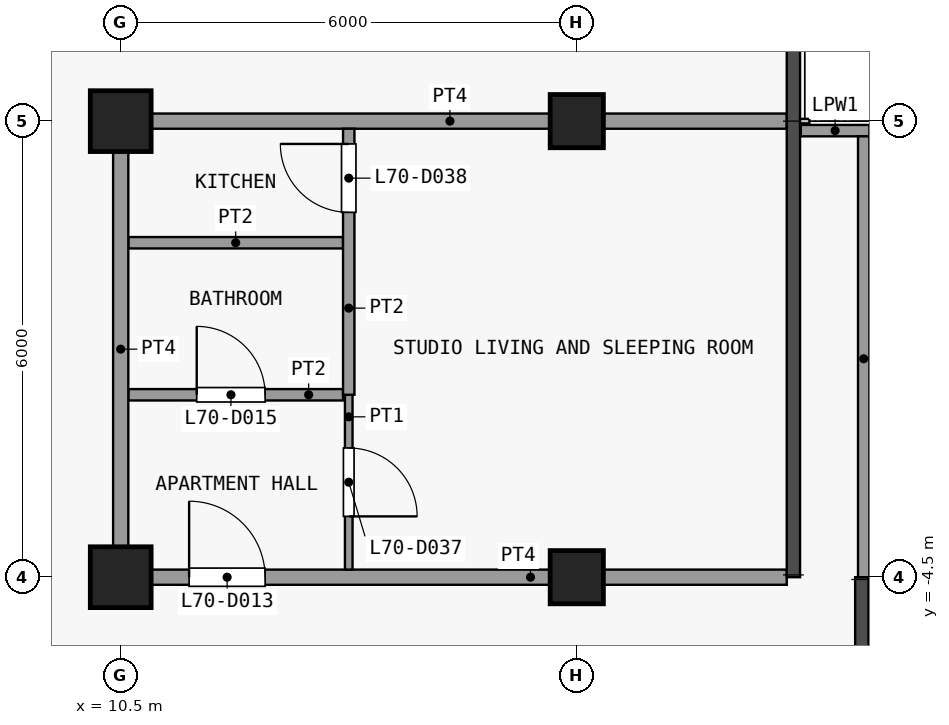
"""IFC4 building model, lengths in metres.
Left out: names, types, materials, properties, quantities, classifications, styles, units other than length and angle.
Written with IfcOpenShell. Run it as: python <this file> out.ifc"""

import sys

from ifc_helpers import new_model, si_unit, direction, frame, frame_2d, origin, origin_2d, place, context, subcontext, project, spatial, rectangle, extrude, element, fill, save


model = new_model("IFC4")
c1 = context("Model", 3, precision=1e-05, world=origin(), true_north=direction((0.0, 1.0)))
c2 = subcontext(c1, "Body", "Model", "MODEL_VIEW")
j1 = project(units=[si_unit("LENGTHUNIT", "METRE"), si_unit("PLANEANGLEUNIT", "RADIAN")], contexts=[c1])
p1 = place(None, origin())
s1 = spatial("IfcSite", under=j1, at=p1, CompositionType="ELEMENT")
p2 = place(p1, origin())
s2 = spatial("IfcBuilding", under=s1, at=p2, CompositionType="ELEMENT")
p3 = place(p2, frame((0.0, 0.0, 277.1)))
s3 = spatial("IfcBuildingStorey", under=s2, at=p3, CompositionType="ELEMENT", Elevation=277.1)
for number, where, z_axis, x_axis in (
    (1, (10.5, -4.5, 0.0), (0.0, 0.0, 1.0), (1.0, 0.0, 0.0)),
    (2, (10.5, 1.5, 0.0), (0.0, 0.0, 1.0), (1.0, 0.0, 0.0)),
):
    element("IfcColumn", number, at=place(p3, frame(where, z_axis=z_axis, x_axis=x_axis)), inside=s3, PredefinedType="COLUMN", context=c2, shape_type="SweptSolid", body=[
        extrude(rectangle(XDim=0.8, YDim=0.8, at=origin_2d()), origin(), (0.0, 0.0, 1.0), 3.6),
    ])
for number, where, z_axis, x_axis in (
    (3, (16.5, -4.5, 0.0), (0.0, 0.0, 1.0), (1.0, 0.0, 0.0)),
    (4, (16.5, 1.5, 0.0), (0.0, 0.0, 1.0), (1.0, 0.0, 0.0)),
):
    element("IfcColumn", number, at=place(p3, frame(where, z_axis=z_axis, x_axis=x_axis)), inside=s3, PredefinedType="COLUMN", context=c2, shape_type="SweptSolid", body=[
        extrude(rectangle(XDim=0.7, YDim=0.7, at=origin_2d()), origin(), (0.0, 0.0, 1.0), 3.6),
    ])
p4 = place(p3, frame((19.448, 1.375, 0.0), z_axis=(0.0, 0.0, 1.0), x_axis=(1.0, 0.0, 0.0)))
e5 = element("IfcWall", 5, at=p4, inside=s3, PredefinedType="PARAPET", context=c2, shape_type="SweptSolid", body=[
    extrude(rectangle(XDim=0.903, YDim=0.15, at=frame_2d((0.451, 0.0))), origin(), (0.0, 0.0, 1.0), 1.15),
])
p5 = place(p3, frame((20.275, 1.3, 0.0), z_axis=(0.0, 0.0, 1.0), x_axis=(0.0, -1.0, 0.0)))
e6 = element("IfcWall", 6, at=p5, inside=s3, PredefinedType="PARAPET", context=c2, shape_type="SweptSolid", body=[
    extrude(rectangle(XDim=5.853, YDim=0.15, at=frame_2d((2.926, 0.0))), origin(), (0.0, 0.0, 1.0), 1.15),
])
p6 = place(p3, frame((10.4, -4.5, 0.0), z_axis=(0.0, 0.0, 1.0), x_axis=(1.0, 0.0, 0.0)))
e7 = element("IfcWall", 7, at=p6, inside=s3, PredefinedType="PARTITIONING", context=c2, shape_type="SweptSolid", body=[
    extrude(rectangle(XDim=8.863, YDim=0.2, at=frame_2d((4.431, 0.0))), origin(), (0.0, 0.0, 1.0), 3.3),
])
p7 = place(p6, frame((1.0, 0.0, 0.0)))
e8 = element("IfcOpeningElement", 8, at=p7, cuts=e7, PredefinedType="OPENING", context=c2, shape_type="SweptSolid", body=[
    extrude(rectangle(XDim=1.0, YDim=2.1, at=frame_2d((0.5, 1.05))), frame((0.0, 0.11, 0.0), z_axis=(0.0, -1.0, 0.0), x_axis=(1.0, 0.0, 0.0)), (0.0, 0.0, 1.0), 0.22),
])
p8 = place(p3, frame((10.6, -2.1, 0.0), z_axis=(0.0, 0.0, 1.0), x_axis=(1.0, 0.0, 0.0)))
e9 = element("IfcWall", 9, at=p8, inside=s3, PredefinedType="PARTITIONING", context=c2, shape_type="SweptSolid", body=[
    extrude(rectangle(XDim=2.825, YDim=0.15, at=frame_2d((1.413, 0.0))), origin(), (0.0, 0.0, 1.0), 3.3),
])
p9 = place(p8, frame((0.9, 0.0, 0.0)))
e10 = element("IfcOpeningElement", 10, at=p9, cuts=e9, PredefinedType="OPENING", context=c2, shape_type="SweptSolid", body=[
    extrude(rectangle(XDim=0.9, YDim=2.1, at=frame_2d((0.45, 1.05))), frame((0.0, 0.085, 0.0), z_axis=(0.0, -1.0, 0.0), x_axis=(1.0, 0.0, 0.0)), (0.0, 0.0, 1.0), 0.17),
])
p10 = place(p3, frame((10.6, -0.1, 0.0), z_axis=(0.0, 0.0, 1.0), x_axis=(1.0, 0.0, 0.0)))
e11 = element("IfcWall", 11, at=p10, inside=s3, PredefinedType="PARTITIONING", context=c2, shape_type="SweptSolid", body=[
    extrude(rectangle(XDim=2.825, YDim=0.15, at=frame_2d((1.413, 0.0))), origin(), (0.0, 0.0, 1.0), 3.3),
])
p11 = place(p3, frame((10.4, 1.5, 0.0), z_axis=(0.0, 0.0, 1.0), x_axis=(1.0, 0.0, 0.0)))
e12 = element("IfcWall", 12, at=p11, inside=s3, PredefinedType="PARTITIONING", context=c2, shape_type="SweptSolid", body=[
    extrude(rectangle(XDim=8.863, YDim=0.2, at=frame_2d((4.431, 0.0))), origin(), (0.0, 0.0, 1.0), 3.3),
])
p12 = place(p3, frame((10.5, -4.4, 0.0), z_axis=(0.0, 0.0, 1.0), x_axis=(0.0, 1.0, 0.0)))
e13 = element("IfcWall", 13, at=p12, inside=s3, PredefinedType="PARTITIONING", context=c2, shape_type="SweptSolid", body=[
    extrude(rectangle(XDim=5.8, YDim=0.2, at=frame_2d((2.9, 0.0))), origin(), (0.0, 0.0, 1.0), 3.3),
])
p13 = place(p3, frame((13.5, -4.4, 0.0), z_axis=(0.0, 0.0, 1.0), x_axis=(0.0, 1.0, 0.0)))
e14 = element("IfcWall", 14, at=p13, inside=s3, PredefinedType="PARTITIONING", context=c2, shape_type="SweptSolid", body=[
    extrude(rectangle(XDim=2.3, YDim=0.1, at=frame_2d((1.15, 0.0))), origin(), (0.0, 0.0, 1.0), 3.3),
])
p14 = place(p13, frame((0.7, 0.0, 0.0)))
e15 = element("IfcOpeningElement", 15, at=p14, cuts=e14, PredefinedType="OPENING", context=c2, shape_type="SweptSolid", body=[
    extrude(rectangle(XDim=0.9, YDim=2.1, at=frame_2d((0.45, 1.05))), frame((0.0, 0.06, 0.0), z_axis=(0.0, -1.0, 0.0), x_axis=(1.0, 0.0, 0.0)), (0.0, 0.0, 1.0), 0.12),
])
p15 = place(p3, frame((13.5, -2.1, 0.0), z_axis=(0.0, 0.0, 1.0), x_axis=(0.0, 1.0, 0.0)))
e16 = element("IfcWall", 16, at=p15, inside=s3, PredefinedType="PARTITIONING", context=c2, shape_type="SweptSolid", body=[
    extrude(rectangle(XDim=3.5, YDim=0.15, at=frame_2d((1.75, 0.0))), origin(), (0.0, 0.0, 1.0), 3.3),
])
p16 = place(p15, frame((2.4, 0.0, 0.0)))
e17 = element("IfcOpeningElement", 17, at=p16, cuts=e16, PredefinedType="OPENING", context=c2, shape_type="SweptSolid", body=[
    extrude(rectangle(XDim=0.9, YDim=2.1, at=frame_2d((0.45, 1.05))), frame((0.0, 0.085, 0.0), z_axis=(0.0, -1.0, 0.0), x_axis=(1.0, 0.0, 0.0)), (0.0, 0.0, 1.0), 0.17),
])
p17 = place(p7, origin())
e18 = element("IfcDoor", 18, at=p17, inside=s3, OperationType="SINGLE_SWING_RIGHT", PredefinedType="DOOR", context=c2, shape_type="SweptSolid", body=[
    extrude(rectangle(XDim=1.0, YDim=2.1, at=frame_2d((0.5, 1.05))), frame((0.0, 0.025, 0.0), z_axis=(0.0, -1.0, 0.0), x_axis=(1.0, 0.0, 0.0)), (0.0, 0.0, 1.0), 0.05),
])
fill(e8, e18)
p18 = place(p9, origin())
e19 = element("IfcDoor", 19, at=p18, inside=s3, OperationType="SINGLE_SWING_RIGHT", PredefinedType="DOOR", context=c2, shape_type="SweptSolid", body=[
    extrude(rectangle(XDim=0.9, YDim=2.1, at=frame_2d((0.45, 1.05))), frame((0.0, 0.025, 0.0), z_axis=(0.0, -1.0, 0.0), x_axis=(1.0, 0.0, 0.0)), (0.0, 0.0, 1.0), 0.05),
])
fill(e10, e19)
p19 = place(p14, origin())
e20 = element("IfcDoor", 20, at=p19, inside=s3, OperationType="SINGLE_SWING_LEFT", PredefinedType="DOOR", context=c2, shape_type="SweptSolid", body=[
    extrude(rectangle(XDim=0.9, YDim=2.1, at=frame_2d((0.45, 1.05))), frame((0.0, 0.025, 0.0), z_axis=(0.0, -1.0, 0.0), x_axis=(1.0, 0.0, 0.0)), (0.0, 0.0, 1.0), 0.05),
])
fill(e15, e20)
p20 = place(p16, origin())
e21 = element("IfcDoor", 21, at=p20, inside=s3, OperationType="SINGLE_SWING_LEFT", PredefinedType="DOOR", context=c2, shape_type="SweptSolid", body=[
    extrude(rectangle(XDim=0.9, YDim=2.1, at=frame_2d((0.45, 1.05))), frame((0.0, 0.025, 0.0), z_axis=(0.0, -1.0, 0.0), x_axis=(1.0, 0.0, 0.0)), (0.0, 0.0, 1.0), 0.05),
])
fill(e17, e21)
save(model, sys.argv[1])
